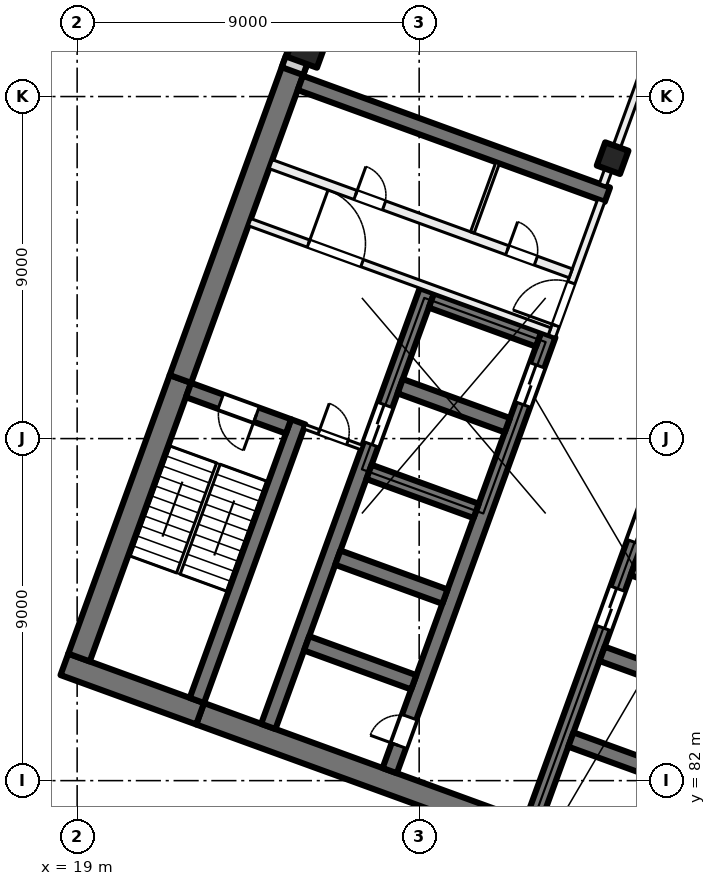
"""IFC4 building model, lengths in metres.
Left out: names, types, materials, properties, quantities, classifications, styles, units other than length and angle.
Written with IfcOpenShell. Run it as: python <this file> out.ifc"""

import sys

from ifc_helpers import new_model, si_unit, direction, frame, frame_2d, origin, origin_2d, place, context, subcontext, project, spatial, rectangle, extrude, element, fill, save


model = new_model("IFC4")
c1 = context("Model", 3, precision=1e-05, world=origin(), true_north=direction((0.0, 1.0)))
c2 = subcontext(c1, "Body", "Model", "MODEL_VIEW")
j1 = project(units=[si_unit("LENGTHUNIT", "METRE"), si_unit("PLANEANGLEUNIT", "RADIAN")], contexts=[c1])
p1 = place(None, origin())
s1 = spatial("IfcSite", under=j1, at=p1, CompositionType="ELEMENT")
p2 = place(p1, origin())
s2 = spatial("IfcBuilding", under=s1, at=p2, CompositionType="ELEMENT")
p3 = place(p2, frame((0.0, 0.0, 105.0)))
s3 = spatial("IfcBuildingStorey", under=s2, at=p3, CompositionType="ELEMENT", Elevation=105.0)
p4 = place(p3, frame((33.091, 98.379, 0.0), z_axis=(0.0, 0.0, 1.0), x_axis=(-0.342020143326, -0.939692620786, 0.0)))
e1 = element("IfcColumn", 1, at=p4, inside=s3, PredefinedType="COLUMN", context=c2, shape_type="SweptSolid", body=[
    extrude(rectangle(XDim=0.65, YDim=0.65, at=origin_2d()), origin(), (0.0, 0.0, 1.0), 4.0),
])
p5 = place(p3, frame((25.056, 101.303, 0.0), z_axis=(0.0, 0.0, 1.0), x_axis=(-0.342020143326, -0.939692620786, 0.0)))
e2 = element("IfcColumn", 2, at=p5, inside=s3, PredefinedType="COLUMN", context=c2, shape_type="SweptSolid", body=[
    extrude(rectangle(XDim=0.85, YDim=0.85, at=origin_2d()), origin(), (0.0, 0.0, 1.0), 4.0),
])
p6 = place(p3, frame((35.767, 78.835, 0.0), z_axis=(0.0, 0.0, 1.0), x_axis=(-0.939692894512, 0.342019391267, 0.0)))
e3 = element("IfcWall", 3, at=p6, inside=s3, PredefinedType="SHEAR", context=c2, shape_type="SweptSolid", body=[
    extrude(rectangle(XDim=14.4, YDim=0.6, at=frame_2d((7.2, 0.0))), origin(), (0.0, 0.0, 1.0), 4.0),
])
p7 = place(p3, frame((22.236, 83.76, 0.0), z_axis=(0.0, 0.0, 1.0), x_axis=(-0.939680822529, 0.342052557032, 0.0)))
e4 = element("IfcWall", 4, at=p7, inside=s3, PredefinedType="SHEAR", context=c2, shape_type="SweptSolid", body=[
    extrude(rectangle(XDim=3.8, YDim=0.6, at=frame_2d((1.9, 0.0))), origin(), (0.0, 0.0, 1.0), 4.0),
])
p8 = place(p3, frame((19.05, 85.239, 0.0), z_axis=(0.0, 0.0, 1.0), x_axis=(0.342016982193, 0.939693771338, 0.0)))
e5 = element("IfcWall", 5, at=p8, inside=s3, PredefinedType="SHEAR", context=c2, shape_type="SweptSolid", body=[
    extrude(rectangle(XDim=7.8, YDim=0.6, at=frame_2d((3.9, 0.0))), origin(), (0.0, 0.0, 1.0), 4.0),
])
p9 = place(p3, frame((21.717, 92.568, 0.0), z_axis=(0.0, 0.0, 1.0), x_axis=(0.342017595281, 0.939693548195, 0.0)))
e6 = element("IfcWall", 6, at=p9, inside=s3, PredefinedType="SHEAR", context=c2, shape_type="SweptSolid", body=[
    extrude(rectangle(XDim=8.925, YDim=0.6, at=frame_2d((4.462, 0.0))), origin(), (0.0, 0.0, 1.0), 4.0),
])
p10 = place(p3, frame((22.15, 84.11, 0.0), z_axis=(0.0, 0.0, 1.0), x_axis=(0.342016982193, 0.939693771338, 0.0)))
e7 = element("IfcWall", 7, at=p10, inside=s3, PredefinedType="SHEAR", context=c2, shape_type="SweptSolid", body=[
    extrude(rectangle(XDim=7.8, YDim=0.4, at=frame_2d((3.9, 0.0))), origin(), (0.0, 0.0, 1.0), 4.0),
])
p11 = place(p3, frame((24.562, 91.32, 0.0), z_axis=(0.0, 0.0, 1.0), x_axis=(-0.939717030584, 0.341953070509, 0.0)))
e8 = element("IfcWall", 8, at=p11, inside=s3, PredefinedType="SHEAR", context=c2, shape_type="SweptSolid", body=[
    extrude(rectangle(XDim=2.8, YDim=0.4, at=frame_2d((1.4, 0.0))), origin(), (0.0, 0.0, 1.0), 4.0),
])
p12 = place(p11, frame((0.9, 0.0, 0.0)))
e9 = element("IfcOpeningElement", 9, at=p12, cuts=e8, PredefinedType="OPENING", context=c2, shape_type="SweptSolid", body=[
    extrude(rectangle(XDim=1.0, YDim=2.1, at=frame_2d((0.5, 1.05))), frame((0.0, 0.21, 0.0), z_axis=(0.0, -1.0, 0.0), x_axis=(1.0, 0.0, 0.0)), (0.0, 0.0, 1.0), 0.42),
])
p13 = place(p3, frame((30.984, 80.895, 0.0), z_axis=(0.0, 0.0, 1.0), x_axis=(0.342021021735, 0.939692301071, 0.0)))
e10 = element("IfcWall", 10, at=p13, inside=s3, PredefinedType="SHEAR", context=c2, shape_type="SweptSolid", body=[
    extrude(rectangle(XDim=12.2, YDim=0.4, at=frame_2d((6.1, 0.0))), origin(), (0.0, 0.0, 1.0), 4.0),
])
p14 = place(p13, frame((5.45, 0.0, 0.0)))
e11 = element("IfcOpeningElement", 11, at=p14, cuts=e10, PredefinedType="OPENING", context=c2, shape_type="SweptSolid", body=[
    extrude(rectangle(XDim=1.1, YDim=2.1, at=frame_2d((0.55, 1.05))), frame((0.0, 0.21, 0.0), z_axis=(0.0, -1.0, 0.0), x_axis=(1.0, 0.0, 0.0)), (0.0, 0.0, 1.0), 0.42),
])
p15 = place(p13, frame((7.85, 0.0, 0.0)))
e12 = element("IfcOpeningElement", 12, at=p15, cuts=e10, PredefinedType="OPENING", context=c2, shape_type="SweptSolid", body=[
    extrude(rectangle(XDim=1.1, YDim=2.1, at=frame_2d((0.55, 1.05))), frame((0.0, 0.21, 0.0), z_axis=(0.0, -1.0, 0.0), x_axis=(1.0, 0.0, 0.0)), (0.0, 0.0, 1.0), 0.42),
])
p16 = place(p13, frame((10.25, 0.0, 0.0)))
e13 = element("IfcOpeningElement", 13, at=p16, cuts=e10, PredefinedType="OPENING", context=c2, shape_type="SweptSolid", body=[
    extrude(rectangle(XDim=1.1, YDim=2.1, at=frame_2d((0.55, 1.05))), frame((0.0, 0.21, 0.0), z_axis=(0.0, -1.0, 0.0), x_axis=(1.0, 0.0, 0.0)), (0.0, 0.0, 1.0), 0.42),
])
for number, where, z_axis, x_axis in (
    (14, (34.812, 82.056, 0.0), (0.0, 0.0, 1.0), (-0.94, 0.342, 0.0)),
    (15, (35.632, 84.311, 0.0), (0.0, 0.0, 1.0), (-0.94, 0.342, 0.0)),
    (16, (36.453, 86.566, 0.0), (0.0, 0.0, 1.0), (-0.94, 0.342, 0.0)),
):
    element("IfcWall", number, at=place(p3, frame(where, z_axis=z_axis, x_axis=x_axis)), inside=s3, PredefinedType="SHEAR", context=c2, shape_type="SweptSolid", body=[
        extrude(rectangle(XDim=3.0, YDim=0.4, at=frame_2d((1.5, 0.0))), origin(), (0.0, 0.0, 1.0), 4.0),
    ])
p17 = place(p3, frame((27.225, 82.263, 0.0), z_axis=(0.0, 0.0, 1.0), x_axis=(0.342014590177, 0.939694641948, 0.0)))
e17 = element("IfcWall", 17, at=p17, inside=s3, PredefinedType="SHEAR", context=c2, shape_type="SweptSolid", body=[
    extrude(rectangle(XDim=12.2, YDim=0.4, at=frame_2d((6.1, 0.0))), origin(), (0.0, 0.0, 1.0), 4.0),
])
p18 = place(p17, frame((10.25, 0.0, 0.0)))
e18 = element("IfcOpeningElement", 18, at=p18, cuts=e17, PredefinedType="OPENING", context=c2, shape_type="SweptSolid", body=[
    extrude(rectangle(XDim=1.1, YDim=2.1, at=frame_2d((0.55, 1.05))), frame((0.0, 0.21, 0.0), z_axis=(0.0, -1.0, 0.0), x_axis=(1.0, 0.0, 0.0)), (0.0, 0.0, 1.0), 0.42),
])
p19 = place(p17, frame((0.7, 0.0, 0.0)))
e19 = element("IfcOpeningElement", 19, at=p19, cuts=e17, PredefinedType="OPENING", context=c2, shape_type="SweptSolid", body=[
    extrude(rectangle(XDim=0.8, YDim=2.1, at=frame_2d((0.4, 1.05))), frame((0.0, 0.21, 0.0), z_axis=(0.0, -1.0, 0.0), x_axis=(1.0, 0.0, 0.0)), (0.0, 0.0, 1.0), 0.42),
])
p20 = place(p3, frame((24.03, 83.426, 0.0), z_axis=(0.0, 0.0, 1.0), x_axis=(0.342014590177, 0.939694641948, 0.0)))
e20 = element("IfcWall", 20, at=p20, inside=s3, PredefinedType="SHEAR", context=c2, shape_type="SweptSolid", body=[
    extrude(rectangle(XDim=12.2, YDim=0.4, at=frame_2d((6.1, 0.0))), origin(), (0.0, 0.0, 1.0), 4.0),
])
p21 = place(p20, frame((7.9, 0.0, 0.0)))
e21 = element("IfcOpeningElement", 21, at=p21, cuts=e20, PredefinedType="OPENING", context=c2, shape_type="SweptSolid", body=[
    extrude(rectangle(XDim=1.1, YDim=2.1, at=frame_2d((0.55, 1.05))), frame((0.0, 0.21, 0.0), z_axis=(0.0, -1.0, 0.0), x_axis=(1.0, 0.0, 0.0)), (0.0, 0.0, 1.0), 0.42),
])
p22 = place(p3, frame((27.858, 84.587, 0.0), z_axis=(0.0, 0.0, 1.0), x_axis=(-0.939686455819, 0.342037080957, 0.0)))
e22 = element("IfcWall", 22, at=p22, inside=s3, PredefinedType="SHEAR", context=c2, shape_type="SweptSolid", body=[
    extrude(rectangle(XDim=3.0, YDim=0.4, at=frame_2d((1.5, 0.0))), origin(), (0.0, 0.0, 1.0), 4.0),
])
p23 = place(p3, frame((28.678, 86.842, 0.0), z_axis=(0.0, 0.0, 1.0), x_axis=(-0.939676934218, 0.342063238742, 0.0)))
e23 = element("IfcWall", 23, at=p23, inside=s3, PredefinedType="SHEAR", context=c2, shape_type="SweptSolid", body=[
    extrude(rectangle(XDim=3.0, YDim=0.4, at=frame_2d((1.5, 0.0))), origin(), (0.0, 0.0, 1.0), 4.0),
])
for number, where, z_axis, x_axis in (
    (24, (29.5, 89.097, 0.0), (0.0, 0.0, 1.0), (-0.94, 0.342, 0.0)),
    (25, (30.32, 91.353, 0.0), (0.0, 0.0, 1.0), (-0.94, 0.342, 0.0)),
    (26, (31.141, 93.608, 0.0), (0.0, 0.0, 1.0), (-0.94, 0.342, 0.0)),
):
    element("IfcWall", number, at=place(p3, frame(where, z_axis=z_axis, x_axis=x_axis)), inside=s3, PredefinedType="SHEAR", context=c2, shape_type="SweptSolid", body=[
        extrude(rectangle(XDim=3.0, YDim=0.4, at=frame_2d((1.5, 0.0))), origin(), (0.0, 0.0, 1.0), 4.0),
    ])
p24 = place(p3, frame((32.953, 97.418, 0.0), z_axis=(0.0, 0.0, 1.0), x_axis=(-0.93969060187, 0.342025690201, 0.0)))
e27 = element("IfcWall", 27, at=p24, inside=s3, PredefinedType="SHEAR", context=c2, shape_type="SweptSolid", body=[
    extrude(rectangle(XDim=8.6, YDim=0.4, at=frame_2d((4.3, 0.0))), origin(), (0.0, 0.0, 1.0), 4.0),
])
p25 = place(p3, frame((24.666, 100.669, 0.0), z_axis=(0.0, 0.0, 1.0), x_axis=(0.34201964167, 0.939692803373, 0.0)))
e28 = element("IfcWall", 28, at=p25, inside=s3, PredefinedType="SOLIDWALL", context=c2, shape_type="SweptSolid", body=[
    extrude(rectangle(XDim=32.884, YDim=0.6, at=frame_2d((16.442, 0.0))), origin(), (0.0, 0.0, 1.0), 3.625),
])
p26 = place(p25, frame((1.48, 0.0, 0.9)))
e29 = element("IfcOpeningElement", 29, at=p26, cuts=e28, PredefinedType="OPENING", context=c2, shape_type="SweptSolid", body=[
    extrude(rectangle(XDim=3.0, YDim=2.4, at=frame_2d((1.5, 1.2))), frame((0.0, 0.31, 0.0), z_axis=(0.0, -1.0, 0.0), x_axis=(1.0, 0.0, 0.0)), (0.0, 0.0, 1.0), 0.62),
])
p27 = place(p25, frame((5.98, 0.0, 0.9)))
e30 = element("IfcOpeningElement", 30, at=p27, cuts=e28, PredefinedType="OPENING", context=c2, shape_type="SweptSolid", body=[
    extrude(rectangle(XDim=3.0, YDim=2.4, at=frame_2d((1.5, 1.2))), frame((0.0, 0.31, 0.0), z_axis=(0.0, -1.0, 0.0), x_axis=(1.0, 0.0, 0.0)), (0.0, 0.0, 1.0), 0.62),
])
p28 = place(p25, frame((10.48, 0.0, 0.9)))
e31 = element("IfcOpeningElement", 31, at=p28, cuts=e28, PredefinedType="OPENING", context=c2, shape_type="SweptSolid", body=[
    extrude(rectangle(XDim=3.0, YDim=2.4, at=frame_2d((1.5, 1.2))), frame((0.0, 0.31, 0.0), z_axis=(0.0, -1.0, 0.0), x_axis=(1.0, 0.0, 0.0)), (0.0, 0.0, 1.0), 0.62),
])
p29 = place(p25, frame((14.98, 0.0, 0.9)))
e32 = element("IfcOpeningElement", 32, at=p29, cuts=e28, PredefinedType="OPENING", context=c2, shape_type="SweptSolid", body=[
    extrude(rectangle(XDim=3.0, YDim=2.4, at=frame_2d((1.5, 1.2))), frame((0.0, 0.31, 0.0), z_axis=(0.0, -1.0, 0.0), x_axis=(1.0, 0.0, 0.0)), (0.0, 0.0, 1.0), 0.62),
])
p30 = place(p25, frame((19.48, 0.0, 0.9)))
e33 = element("IfcOpeningElement", 33, at=p30, cuts=e28, PredefinedType="OPENING", context=c2, shape_type="SweptSolid", body=[
    extrude(rectangle(XDim=3.0, YDim=2.4, at=frame_2d((1.5, 1.2))), frame((0.0, 0.31, 0.0), z_axis=(0.0, -1.0, 0.0), x_axis=(1.0, 0.0, 0.0)), (0.0, 0.0, 1.0), 0.62),
])
p31 = place(p25, frame((23.98, 0.0, 0.9)))
e34 = element("IfcOpeningElement", 34, at=p31, cuts=e28, PredefinedType="OPENING", context=c2, shape_type="SweptSolid", body=[
    extrude(rectangle(XDim=3.0, YDim=2.4, at=frame_2d((1.5, 1.2))), frame((0.0, 0.31, 0.0), z_axis=(0.0, -1.0, 0.0), x_axis=(1.0, 0.0, 0.0)), (0.0, 0.0, 1.0), 0.62),
])
p32 = place(p25, frame((28.48, 0.0, 0.9)))
e35 = element("IfcOpeningElement", 35, at=p32, cuts=e28, PredefinedType="OPENING", context=c2, shape_type="SweptSolid", body=[
    extrude(rectangle(XDim=3.0, YDim=2.4, at=frame_2d((1.5, 1.2))), frame((0.0, 0.31, 0.0), z_axis=(0.0, -1.0, 0.0), x_axis=(1.0, 0.0, 0.0)), (0.0, 0.0, 1.0), 0.62),
])
p33 = place(p3, frame((31.491, 93.693, 0.0), z_axis=(0.0, 0.0, 1.0), x_axis=(0.341995824804, 0.939701471648, 0.0)))
e36 = element("IfcWall", 36, at=p33, inside=s3, PredefinedType="PARTITIONING", context=c2, shape_type="SweptSolid", body=[
    extrude(rectangle(XDim=3.8, YDim=0.2, at=frame_2d((1.9, 0.0))), origin(), (0.0, 0.0, 1.0), 3.625),
])
p34 = place(p33, frame((0.3, 0.0, 0.0)))
e37 = element("IfcOpeningElement", 37, at=p34, cuts=e36, PredefinedType="OPENING", context=c2, shape_type="SweptSolid", body=[
    extrude(rectangle(XDim=1.2, YDim=2.1, at=frame_2d((0.6, 1.05))), frame((0.0, 0.11, 0.0), z_axis=(0.0, -1.0, 0.0), x_axis=(1.0, 0.0, 0.0)), (0.0, 0.0, 1.0), 0.22),
])
p35 = place(p3, frame((23.538, 96.694, 0.0), z_axis=(0.0, 0.0, 1.0), x_axis=(0.939691552312, -0.342023078919, 0.0)))
e38 = element("IfcWall", 38, at=p35, inside=s3, PredefinedType="PARTITIONING", context=c2, shape_type="SweptSolid", body=[
    extrude(rectangle(XDim=8.4, YDim=0.2, at=frame_2d((4.2, 0.0))), origin(), (0.0, 0.0, 1.0), 3.625),
])
p36 = place(p35, frame((1.65, 0.0, 0.0)))
e39 = element("IfcOpeningElement", 39, at=p36, cuts=e38, PredefinedType="OPENING", context=c2, shape_type="SweptSolid", body=[
    extrude(rectangle(XDim=1.5, YDim=2.1, at=frame_2d((0.75, 1.05))), frame((0.0, 0.11, 0.0), z_axis=(0.0, -1.0, 0.0), x_axis=(1.0, 0.0, 0.0)), (0.0, 0.0, 1.0), 0.22),
])
p37 = place(p3, frame((24.094, 98.221, 0.0), z_axis=(0.0, 0.0, 1.0), x_axis=(0.939691552312, -0.342023078919, 0.0)))
e40 = element("IfcWall", 40, at=p37, inside=s3, PredefinedType="PARTITIONING", context=c2, shape_type="SweptSolid", body=[
    extrude(rectangle(XDim=8.4, YDim=0.25, at=frame_2d((4.2, 0.0))), origin(), (0.0, 0.0, 1.0), 3.625),
])
p38 = place(p37, frame((6.625, 0.0, 0.0)))
e41 = element("IfcOpeningElement", 41, at=p38, cuts=e40, PredefinedType="OPENING", context=c2, shape_type="SweptSolid", body=[
    extrude(rectangle(XDim=0.8, YDim=2.1, at=frame_2d((0.4, 1.05))), frame((0.0, 0.135, 0.0), z_axis=(0.0, -1.0, 0.0), x_axis=(1.0, 0.0, 0.0)), (0.0, 0.0, 1.0), 0.27),
])
p39 = place(p37, frame((2.375, 0.0, 0.0)))
e42 = element("IfcOpeningElement", 42, at=p39, cuts=e40, PredefinedType="OPENING", context=c2, shape_type="SweptSolid", body=[
    extrude(rectangle(XDim=0.8, YDim=2.1, at=frame_2d((0.4, 1.05))), frame((0.0, 0.135, 0.0), z_axis=(0.0, -1.0, 0.0), x_axis=(1.0, 0.0, 0.0)), (0.0, 0.0, 1.0), 0.27),
])
p40 = place(p3, frame((24.985, 91.312, 0.0), z_axis=(0.0, 0.0, 1.0), x_axis=(0.939708740826, -0.341975850632, 0.0)))
e43 = element("IfcWall", 43, at=p40, inside=s3, PredefinedType="PARTITIONING", context=c2, shape_type="SweptSolid", body=[
    extrude(rectangle(XDim=1.6, YDim=0.125, at=frame_2d((0.8, 0.0))), origin(), (0.0, 0.0, 1.0), 3.625),
])
p41 = place(p40, frame((0.4, 0.0, 0.0)))
e44 = element("IfcOpeningElement", 44, at=p41, cuts=e43, PredefinedType="OPENING", context=c2, shape_type="SweptSolid", body=[
    extrude(rectangle(XDim=0.8, YDim=2.1, at=frame_2d((0.4, 1.05))), frame((0.0, 0.073, 0.0), z_axis=(0.0, -1.0, 0.0), x_axis=(1.0, 0.0, 0.0)), (0.0, 0.0, 1.0), 0.145),
])
p42 = place(p3, frame((29.399, 96.424, 0.0), z_axis=(0.0, 0.0, 1.0), x_axis=(0.341913947243, 0.939731266204, 0.0)))
e45 = element("IfcWall", 45, at=p42, inside=s3, PredefinedType="PARTITIONING", context=c2, shape_type="SweptSolid", body=[
    extrude(rectangle(XDim=1.95, YDim=0.1, at=frame_2d((0.975, 0.0))), origin(), (0.0, 0.0, 1.0), 3.625),
])
p43 = place(p3, frame((32.834, 97.674, 0.0), z_axis=(0.0, 0.0, 1.0), x_axis=(0.342048644688, 0.939682246649, 0.0)))
e46 = element("IfcWall", 46, at=p43, inside=s3, PredefinedType="PARTITIONING", context=c2, shape_type="SweptSolid", body=[
    extrude(rectangle(XDim=9.75, YDim=0.2, at=frame_2d((4.875, 0.0))), origin(), (0.0, 0.0, 1.0), 3.625),
])
p44 = place(p43, frame((4.377, 0.0, 0.0)))
e47 = element("IfcOpeningElement", 47, at=p44, cuts=e46, PredefinedType="OPENING", context=c2, shape_type="SweptSolid", body=[
    extrude(rectangle(XDim=1.0, YDim=2.1, at=frame_2d((0.5, 1.05))), frame((0.0, 0.11, 0.0), z_axis=(0.0, -1.0, 0.0), x_axis=(1.0, 0.0, 0.0)), (0.0, 0.0, 1.0), 0.22),
])
p45 = place(p18, origin())
e48 = element("IfcDoor", 48, at=p45, inside=s3, OperationType="DOUBLE_DOOR_SLIDING", PredefinedType="DOOR", context=c2, shape_type="SweptSolid", body=[
    extrude(rectangle(XDim=1.1, YDim=2.1, at=frame_2d((0.55, 1.05))), frame((0.0, 0.025, 0.0), z_axis=(0.0, -1.0, 0.0), x_axis=(1.0, 0.0, 0.0)), (0.0, 0.0, 1.0), 0.05),
])
fill(e18, e48)
p46 = place(p14, origin())
e49 = element("IfcDoor", 49, at=p46, inside=s3, OperationType="DOUBLE_DOOR_SLIDING", PredefinedType="DOOR", context=c2, shape_type="SweptSolid", body=[
    extrude(rectangle(XDim=1.1, YDim=2.1, at=frame_2d((0.55, 1.05))), frame((0.0, 0.025, 0.0), z_axis=(0.0, -1.0, 0.0), x_axis=(1.0, 0.0, 0.0)), (0.0, 0.0, 1.0), 0.05),
])
fill(e11, e49)
p47 = place(p15, origin())
e50 = element("IfcDoor", 50, at=p47, inside=s3, OperationType="DOUBLE_DOOR_SLIDING", PredefinedType="DOOR", context=c2, shape_type="SweptSolid", body=[
    extrude(rectangle(XDim=1.1, YDim=2.1, at=frame_2d((0.55, 1.05))), frame((0.0, 0.025, 0.0), z_axis=(0.0, -1.0, 0.0), x_axis=(1.0, 0.0, 0.0)), (0.0, 0.0, 1.0), 0.05),
])
fill(e12, e50)
p48 = place(p19, origin())
e51 = element("IfcDoor", 51, at=p48, inside=s3, OperationType="SINGLE_SWING_LEFT", PredefinedType="DOOR", context=c2, shape_type="SweptSolid", body=[
    extrude(rectangle(XDim=0.8, YDim=2.1, at=frame_2d((0.4, 1.05))), frame((0.0, 0.025, 0.0), z_axis=(0.0, -1.0, 0.0), x_axis=(1.0, 0.0, 0.0)), (0.0, 0.0, 1.0), 0.05),
])
fill(e19, e51)
p49 = place(p34, origin())
e52 = element("IfcDoor", 52, at=p49, inside=s3, OperationType="DOUBLE_DOOR_SINGLE_SWING", PredefinedType="DOOR", context=c2, shape_type="SweptSolid", body=[
    extrude(rectangle(XDim=1.2, YDim=2.1, at=frame_2d((0.6, 1.05))), frame((0.0, 0.025, 0.0), z_axis=(0.0, -1.0, 0.0), x_axis=(1.0, 0.0, 0.0)), (0.0, 0.0, 1.0), 0.05),
])
fill(e37, e52)
p50 = place(p36, origin())
e53 = element("IfcDoor", 53, at=p50, inside=s3, OperationType="DOUBLE_DOOR_SINGLE_SWING", PredefinedType="DOOR", context=c2, shape_type="SweptSolid", body=[
    extrude(rectangle(XDim=1.5, YDim=2.1, at=frame_2d((0.75, 1.05))), frame((0.0, 0.025, 0.0), z_axis=(0.0, -1.0, 0.0), x_axis=(1.0, 0.0, 0.0)), (0.0, 0.0, 1.0), 0.05),
])
fill(e39, e53)
p51 = place(p12, origin())
e54 = element("IfcDoor", 54, at=p51, inside=s3, OperationType="SINGLE_SWING_LEFT", PredefinedType="DOOR", context=c2, shape_type="SweptSolid", body=[
    extrude(rectangle(XDim=1.0, YDim=2.1, at=frame_2d((0.5, 1.05))), frame((0.0, 0.025, 0.0), z_axis=(0.0, -1.0, 0.0), x_axis=(1.0, 0.0, 0.0)), (0.0, 0.0, 1.0), 0.05),
])
fill(e9, e54)
p52 = place(p41, origin())
e55 = element("IfcDoor", 55, at=p52, inside=s3, OperationType="SINGLE_SWING_RIGHT", PredefinedType="DOOR", context=c2, shape_type="SweptSolid", body=[
    extrude(rectangle(XDim=0.8, YDim=2.1, at=frame_2d((0.4, 1.05))), frame((0.0, 0.025, 0.0), z_axis=(0.0, -1.0, 0.0), x_axis=(1.0, 0.0, 0.0)), (0.0, 0.0, 1.0), 0.05),
])
fill(e44, e55)
p53 = place(p38, origin())
e56 = element("IfcDoor", 56, at=p53, inside=s3, OperationType="SINGLE_SWING_LEFT", PredefinedType="DOOR", context=c2, shape_type="SweptSolid", body=[
    extrude(rectangle(XDim=0.8, YDim=2.1, at=frame_2d((0.4, 1.05))), frame((0.0, 0.025, 0.0), z_axis=(0.0, -1.0, 0.0), x_axis=(1.0, 0.0, 0.0)), (0.0, 0.0, 1.0), 0.05),
])
fill(e41, e56)
p54 = place(p39, origin())
e57 = element("IfcDoor", 57, at=p54, inside=s3, OperationType="SINGLE_SWING_RIGHT", PredefinedType="DOOR", context=c2, shape_type="SweptSolid", body=[
    extrude(rectangle(XDim=0.8, YDim=2.1, at=frame_2d((0.4, 1.05))), frame((0.0, 0.025, 0.0), z_axis=(0.0, -1.0, 0.0), x_axis=(1.0, 0.0, 0.0)), (0.0, 0.0, 1.0), 0.05),
])
fill(e42, e57)
p55 = place(p21, origin())
e58 = element("IfcDoor", 58, at=p55, inside=s3, OperationType="DOUBLE_DOOR_SLIDING", PredefinedType="DOOR", context=c2, shape_type="SweptSolid", body=[
    extrude(rectangle(XDim=1.1, YDim=2.1, at=frame_2d((0.55, 1.05))), frame((0.0, 0.025, 0.0), z_axis=(0.0, -1.0, 0.0), x_axis=(1.0, 0.0, 0.0)), (0.0, 0.0, 1.0), 0.05),
])
fill(e21, e58)
save(model, sys.argv[1])
